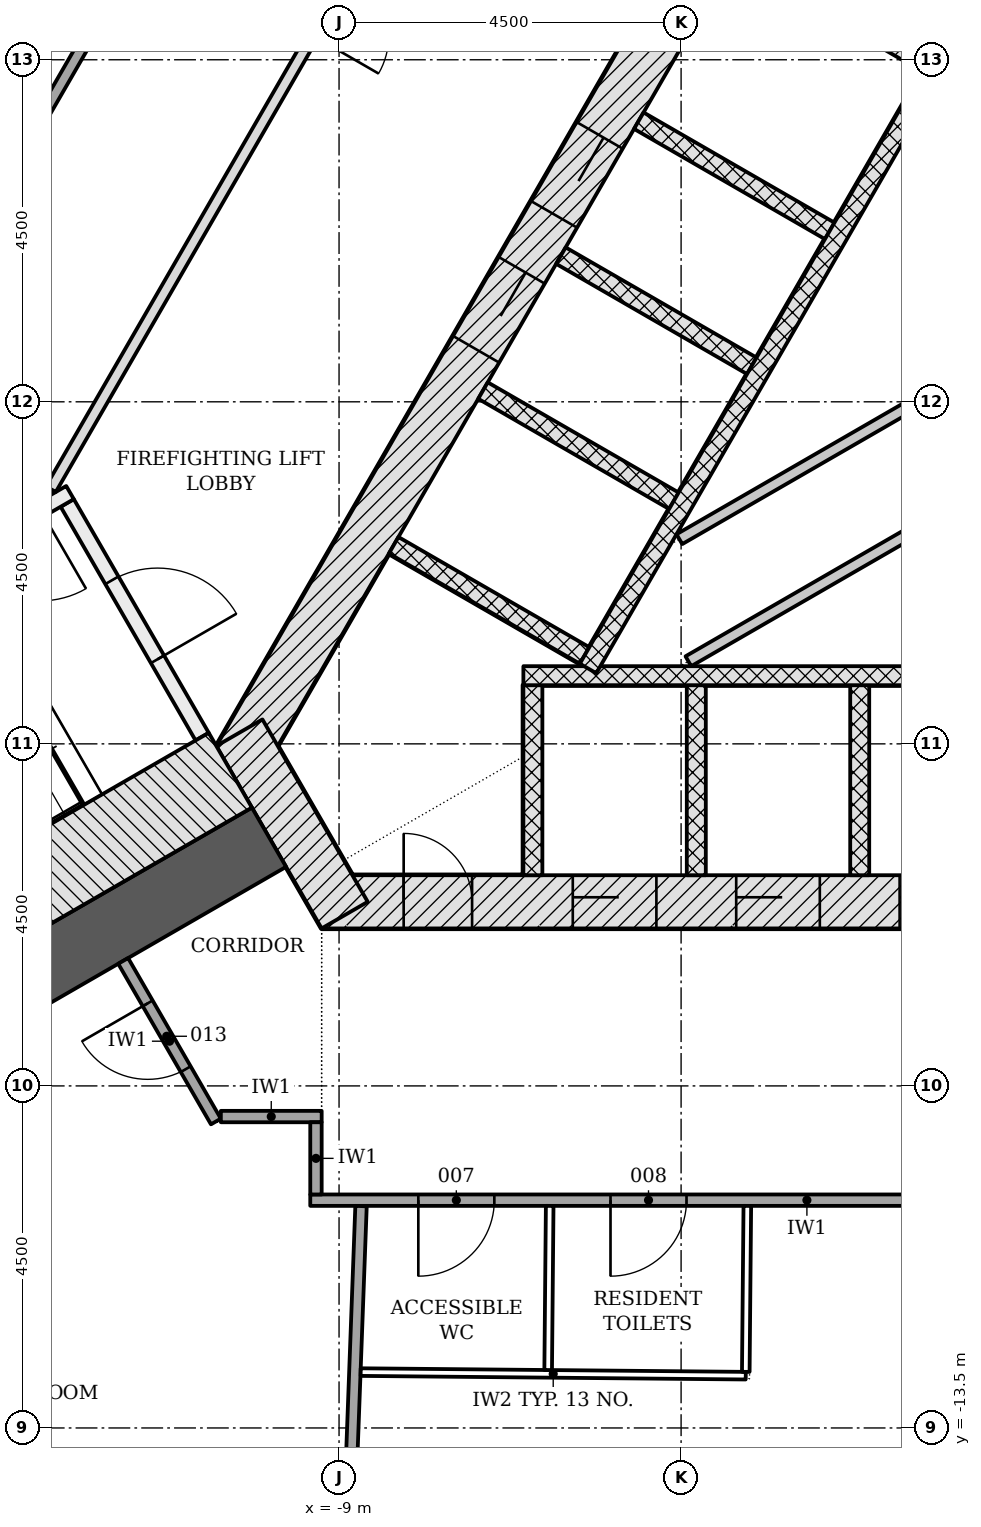
"""IFC4 building model, lengths in metres.
Left out: names, types, materials, properties, quantities, classifications, styles, units other than length and angle.
Written with IfcOpenShell. Run it as: python <this file> out.ifc"""

import sys

from ifc_helpers import new_model, si_unit, direction, frame, frame_2d, origin, place, context, subcontext, project, spatial, rectangle, extrude, element, fill, save


model = new_model("IFC4")
c1 = context("Model", 3, precision=1e-05, world=origin(), true_north=direction((0.0, 1.0)))
c2 = subcontext(c1, "Body", "Model", "MODEL_VIEW")
j1 = project(units=[si_unit("LENGTHUNIT", "METRE"), si_unit("PLANEANGLEUNIT", "RADIAN")], contexts=[c1])
p1 = place(None, origin())
s1 = spatial("IfcSite", under=j1, at=p1, CompositionType="ELEMENT")
p2 = place(p1, origin())
s2 = spatial("IfcBuilding", under=s1, at=p2, CompositionType="ELEMENT")
p3 = place(p2, frame((0.0, 0.0, 27.6)))
s3 = spatial("IfcBuildingStorey", under=s2, at=p3, CompositionType="ELEMENT", Elevation=27.6)
p4 = place(p3, frame((-9.229, -6.578, -0.2), z_axis=(0.0, 0.0, 1.0), x_axis=(1.0, 0.0, 0.0)))
e1 = element("IfcWall", 1, at=p4, inside=s3, PredefinedType="SHEAR", context=c2, shape_type="SweptSolid", body=[
    extrude(rectangle(XDim=18.458, YDim=0.7, at=frame_2d((9.229, 0.0))), origin(), (0.0, 0.0, 1.0), 3.6),
])
p5 = place(p4, frame((3.304, 0.0, 0.2)))
e2 = element("IfcOpeningElement", 2, at=p5, cuts=e1, PredefinedType="OPENING", context=c2, shape_type="SweptSolid", body=[
    extrude(rectangle(XDim=1.1, YDim=2.1, at=frame_2d((0.55, 1.05))), frame((0.0, 0.36, 0.0), z_axis=(0.0, -1.0, 0.0), x_axis=(1.0, 0.0, 0.0)), (0.0, 0.0, 1.0), 0.72),
])
p6 = place(p4, frame((5.454, 0.0, 0.2)))
e3 = element("IfcOpeningElement", 3, at=p6, cuts=e1, PredefinedType="OPENING", context=c2, shape_type="SweptSolid", body=[
    extrude(rectangle(XDim=1.1, YDim=2.1, at=frame_2d((0.55, 1.05))), frame((0.0, 0.36, 0.0), z_axis=(0.0, -1.0, 0.0), x_axis=(1.0, 0.0, 0.0)), (0.0, 0.0, 1.0), 0.72),
])
p7 = place(p4, frame((7.604, 0.0, 0.2)))
e4 = element("IfcOpeningElement", 4, at=p7, cuts=e1, PredefinedType="OPENING", context=c2, shape_type="SweptSolid", body=[
    extrude(rectangle(XDim=1.1, YDim=2.1, at=frame_2d((0.55, 1.05))), frame((0.0, 0.36, 0.0), z_axis=(0.0, -1.0, 0.0), x_axis=(1.0, 0.0, 0.0)), (0.0, 0.0, 1.0), 0.72),
])
p8 = place(p4, frame((9.754, 0.0, 0.2)))
e5 = element("IfcOpeningElement", 5, at=p8, cuts=e1, PredefinedType="OPENING", context=c2, shape_type="SweptSolid", body=[
    extrude(rectangle(XDim=1.1, YDim=2.1, at=frame_2d((0.55, 1.05))), frame((0.0, 0.36, 0.0), z_axis=(0.0, -1.0, 0.0), x_axis=(1.0, 0.0, 0.0)), (0.0, 0.0, 1.0), 0.72),
])
p9 = place(p4, frame((11.904, 0.0, 0.2)))
e6 = element("IfcOpeningElement", 6, at=p9, cuts=e1, PredefinedType="OPENING", context=c2, shape_type="SweptSolid", body=[
    extrude(rectangle(XDim=1.1, YDim=2.1, at=frame_2d((0.55, 1.05))), frame((0.0, 0.36, 0.0), z_axis=(0.0, -1.0, 0.0), x_axis=(1.0, 0.0, 0.0)), (0.0, 0.0, 1.0), 0.72),
])
p10 = place(p4, frame((14.054, 0.0, 0.2)))
e7 = element("IfcOpeningElement", 7, at=p10, cuts=e1, PredefinedType="OPENING", context=c2, shape_type="SweptSolid", body=[
    extrude(rectangle(XDim=1.1, YDim=2.1, at=frame_2d((0.55, 1.05))), frame((0.0, 0.36, 0.0), z_axis=(0.0, -1.0, 0.0), x_axis=(1.0, 0.0, 0.0)), (0.0, 0.0, 1.0), 0.72),
])
p11 = place(p4, frame((1.079, 0.0, 0.2)))
e8 = element("IfcOpeningElement", 8, at=p11, cuts=e1, PredefinedType="OPENING", context=c2, shape_type="SweptSolid", body=[
    extrude(rectangle(XDim=0.9, YDim=2.1, at=frame_2d((0.45, 1.05))), frame((0.0, 0.36, 0.0), z_axis=(0.0, -1.0, 0.0), x_axis=(1.0, 0.0, 0.0)), (0.0, 0.0, 1.0), 0.72),
])
p12 = place(p3, frame((-1.083, 11.281, -0.2), z_axis=(0.0, 0.0, 1.0), x_axis=(-0.500001446645, -0.866024568562, 0.0)))
e9 = element("IfcWall", 9, at=p12, inside=s3, PredefinedType="SHEAR", context=c2, shape_type="SweptSolid", body=[
    extrude(rectangle(XDim=18.458, YDim=0.7, at=frame_2d((9.229, 0.0))), origin(), (0.0, 0.0, 1.0), 3.6),
])
p13 = place(p12, frame((8.979, 0.0, 0.2)))
e10 = element("IfcOpeningElement", 10, at=p13, cuts=e9, PredefinedType="OPENING", context=c2, shape_type="SweptSolid", body=[
    extrude(rectangle(XDim=1.2, YDim=2.1, at=frame_2d((0.6, 1.05))), frame((0.0, 0.36, 0.0), z_axis=(0.0, -1.0, 0.0), x_axis=(1.0, 0.0, 0.0)), (0.0, 0.0, 1.0), 0.72),
])
p14 = place(p12, frame((11.029, 0.0, 0.2)))
e11 = element("IfcOpeningElement", 11, at=p14, cuts=e9, PredefinedType="OPENING", context=c2, shape_type="SweptSolid", body=[
    extrude(rectangle(XDim=1.2, YDim=2.1, at=frame_2d((0.6, 1.05))), frame((0.0, 0.36, 0.0), z_axis=(0.0, -1.0, 0.0), x_axis=(1.0, 0.0, 0.0)), (0.0, 0.0, 1.0), 0.72),
])
p15 = place(p3, frame((-10.311, -4.353, -0.2), z_axis=(0.0, 0.0, 1.0), x_axis=(0.500042739161, -0.866000726912, 0.0)))
e12 = element("IfcWall", 12, at=p15, inside=s3, PredefinedType="SHEAR", context=c2, shape_type="SweptSolid", body=[
    extrude(rectangle(XDim=2.771, YDim=0.7, at=frame_2d((1.386, 0.0))), origin(), (0.0, 0.0, 1.0), 3.6),
])
p16 = place(p3, frame((-9.922, -5.728, -0.2), z_axis=(0.0, 0.0, 1.0), x_axis=(-0.866028046028, -0.499995423472, 0.0)))
e13 = element("IfcWall", 13, at=p16, inside=s3, PredefinedType="SHEAR", context=c2, shape_type="SweptSolid", body=[
    extrude(rectangle(XDim=14.633, YDim=0.9, at=frame_2d((7.316, 0.0))), origin(), (0.0, 0.0, 1.0), 3.6),
])
for number, where, z_axis, x_axis in (
    (14, (-6.45, -6.228, -0.2), (0.0, 0.0, 1.0), (0.0, 1.0, 0.0)),
    (15, (-4.3, -6.228, -0.2), (0.0, 0.0, 1.0), (0.0, 1.0, 0.0)),
    (16, (-2.15, -6.228, -0.2), (0.0, 0.0, 1.0), (0.0, 1.0, 0.0)),
):
    element("IfcWall", number, at=place(p3, frame(where, z_axis=z_axis, x_axis=x_axis)), inside=s3, PredefinedType="PARTITIONING", context=c2, shape_type="SweptSolid", body=[
        extrude(rectangle(XDim=2.5, YDim=0.25, at=frame_2d((1.25, 0.0))), origin(), (0.0, 0.0, 1.0), 3.6),
    ])
p17 = place(p3, frame((-6.575, -3.603, 0.0), z_axis=(0.0, 0.0, 1.0), x_axis=(1.0, 0.0, 0.0)))
e17 = element("IfcWall", 17, at=p17, inside=s3, PredefinedType="PARTITIONING", context=c2, shape_type="SweptSolid", body=[
    extrude(rectangle(XDim=13.15, YDim=0.25, at=frame_2d((6.575, 0.0))), origin(), (0.0, 0.0, 1.0), 3.4),
])
for number, where, z_axis, x_axis in (
    (18, (-3.781, 5.907, -0.2), (0.0, 0.0, 1.0), (0.866, -0.5, 0.0)),
    (19, (-5.056, 3.699, -0.2), (0.0, 0.0, 1.0), (0.866, -0.5, 0.0)),
    (20, (-6.081, 1.923, -0.2), (0.0, 0.0, 1.0), (0.866, -0.5, 0.0)),
    (21, (-7.106, 0.148, -0.2), (0.0, 0.0, 1.0), (0.866, -0.5, 0.0)),
    (22, (-8.281, -1.887, -0.2), (0.0, 0.0, 1.0), (0.866, -0.5, 0.0)),
):
    element("IfcWall", number, at=place(p3, frame(where, z_axis=z_axis, x_axis=x_axis)), inside=s3, PredefinedType="PARTITIONING", context=c2, shape_type="SweptSolid", body=[
        extrude(rectangle(XDim=2.9, YDim=0.25, at=frame_2d((1.45, 0.0))), origin(), (0.0, 0.0, 1.0), 3.6),
    ])
p18 = place(p3, frame((0.176, 6.711, 0.0), z_axis=(0.0, 0.0, 1.0), x_axis=(-0.500004227369, -0.866022963098, 0.0)))
e23 = element("IfcWall", 23, at=p18, inside=s3, PredefinedType="PARTITIONING", context=c2, shape_type="SweptSolid", body=[
    extrude(rectangle(XDim=11.8, YDim=0.25, at=frame_2d((5.9, 0.0))), origin(), (0.0, 0.0, 1.0), 3.4),
])
p19 = place(p3, frame((-4.523, -1.807, 0.0), z_axis=(0.0, 0.0, 1.0), x_axis=(0.866030300338, 0.499991518824, 0.0)))
e24 = element("IfcWall", 24, at=p19, inside=s3, PredefinedType="PARTITIONING", context=c2, shape_type="SweptSolid", body=[
    extrude(rectangle(XDim=11.049, YDim=0.15, at=frame_2d((5.524, 0.0))), origin(), (0.0, 0.0, 1.0), 3.4),
])
p20 = place(p19, frame((3.525, 0.0, 0.0)))
e25 = element("IfcOpeningElement", 25, at=p20, cuts=e24, PredefinedType="OPENING", context=c2, shape_type="SweptSolid", body=[
    extrude(rectangle(XDim=0.9, YDim=2.1, at=frame_2d((0.45, 1.05))), frame((0.0, 0.085, 0.0), z_axis=(0.0, -1.0, 0.0), x_axis=(1.0, 0.0, 0.0)), (0.0, 0.0, 1.0), 0.17),
])
p21 = place(p3, frame((-4.404, -3.413, 0.0), z_axis=(0.0, 0.0, 1.0), x_axis=(0.866022252853, 0.500005457533, 0.0)))
e26 = element("IfcWall", 26, at=p21, inside=s3, PredefinedType="PARTITIONING", context=c2, shape_type="SweptSolid", body=[
    extrude(rectangle(XDim=11.749, YDim=0.15, at=frame_2d((5.875, 0.0))), origin(), (0.0, 0.0, 1.0), 3.4),
])
p22 = place(p21, frame((3.875, 0.0, 0.0)))
e27 = element("IfcOpeningElement", 27, at=p22, cuts=e26, PredefinedType="OPENING", context=c2, shape_type="SweptSolid", body=[
    extrude(rectangle(XDim=0.9, YDim=2.1, at=frame_2d((0.45, 1.05))), frame((0.0, 0.085, 0.0), z_axis=(0.0, -1.0, 0.0), x_axis=(1.0, 0.0, 0.0)), (0.0, 0.0, 1.0), 0.17),
])
p23 = place(p3, frame((-12.576, -1.331, -0.2), z_axis=(0.0, 0.0, 1.0), x_axis=(0.499970499736, -0.8660424351, 0.0)))
e28 = element("IfcWall", 28, at=p23, inside=s3, PredefinedType="SHEAR", context=c2, shape_type="SweptSolid", body=[
    extrude(rectangle(XDim=3.55, YDim=0.2, at=frame_2d((1.775, 0.0))), origin(), (0.0, 0.0, 1.0), 3.6),
])
p24 = place(p23, frame((1.175, 0.0, 0.2)))
e29 = element("IfcOpeningElement", 29, at=p24, cuts=e28, PredefinedType="OPENING", context=c2, shape_type="SweptSolid", body=[
    extrude(rectangle(XDim=1.2, YDim=2.1, at=frame_2d((0.6, 1.05))), frame((0.0, 0.11, 0.0), z_axis=(0.0, -1.0, 0.0), x_axis=(1.0, 0.0, 0.0)), (0.0, 0.0, 1.0), 0.22),
])
p25 = place(p3, frame((-12.539, -1.194, -0.2), z_axis=(0.0, 0.0, 1.0), x_axis=(-0.866045472092, -0.499965239061, 0.0)))
e30 = element("IfcWall", 30, at=p25, inside=s3, PredefinedType="SHEAR", context=c2, shape_type="SweptSolid", body=[
    extrude(rectangle(XDim=5.6, YDim=0.2, at=frame_2d((2.8, 0.0))), origin(), (0.0, 0.0, 1.0), 3.6),
])
p26 = place(p25, frame((0.45, 0.0, 0.2)))
e31 = element("IfcOpeningElement", 31, at=p26, cuts=e30, PredefinedType="OPENING", context=c2, shape_type="SweptSolid", body=[
    extrude(rectangle(XDim=1.2, YDim=2.1, at=frame_2d((0.6, 1.05))), frame((0.0, 0.11, 0.0), z_axis=(0.0, -1.0, 0.0), x_axis=(1.0, 0.0, 0.0)), (0.0, 0.0, 1.0), 0.22),
])
p27 = place(p3, frame((-10.43, -4.847, -0.2), z_axis=(0.0, 0.0, 1.0), x_axis=(-0.866018442252, -0.500012057535, 0.0)))
e32 = element("IfcWall", 32, at=p27, inside=s3, PredefinedType="SHEAR", context=c2, shape_type="SweptSolid", body=[
    extrude(rectangle(XDim=7.2, YDim=1.136, at=frame_2d((3.6, 0.0))), origin(), (0.0, 0.0, 1.0), 3.6),
])
p28 = place(p3, frame((-17.208, -3.699, 0.0), z_axis=(0.0, 0.0, 1.0), x_axis=(0.499997567621, 0.866026808115, 0.0)))
e33 = element("IfcWall", 33, at=p28, inside=s3, PredefinedType="PARTITIONING", context=c2, shape_type="SweptSolid", body=[
    extrude(rectangle(XDim=23.736, YDim=0.15, at=frame_2d((11.868, 0.0))), origin(), (0.0, 0.0, 1.0), 2.768),
])
p29 = place(p28, frame((16.656, 0.0, 0.0)))
e34 = element("IfcOpeningElement", 34, at=p29, cuts=e33, PredefinedType="OPENING", context=c2, shape_type="SweptSolid", body=[
    extrude(rectangle(XDim=1.1, YDim=2.1, at=frame_2d((0.55, 1.05))), frame((0.0, 0.085, 0.0), z_axis=(0.0, -1.0, 0.0), x_axis=(1.0, 0.0, 0.0)), (0.0, 0.0, 1.0), 0.17),
])
p30 = place(p28, frame((14.662, 0.0, 0.0)))
e35 = element("IfcOpeningElement", 35, at=p30, cuts=e33, PredefinedType="OPENING", context=c2, shape_type="SweptSolid", body=[
    extrude(rectangle(XDim=1.1, YDim=2.1, at=frame_2d((0.55, 1.05))), frame((0.0, 0.085, 0.0), z_axis=(0.0, -1.0, 0.0), x_axis=(1.0, 0.0, 0.0)), (0.0, 0.0, 1.0), 0.17),
])
p31 = place(p28, frame((5.273, 0.0, 0.0)))
e36 = element("IfcOpeningElement", 36, at=p31, cuts=e33, PredefinedType="OPENING", context=c2, shape_type="SweptSolid", body=[
    extrude(rectangle(XDim=1.0, YDim=2.1, at=frame_2d((0.5, 1.05))), frame((0.0, 0.085, 0.0), z_axis=(0.0, -1.0, 0.0), x_axis=(1.0, 0.0, 0.0)), (0.0, 0.0, 1.0), 0.17),
])
p32 = place(p3, frame((-4.407, 13.374, 0.0), z_axis=(0.0, 0.0, 1.0), x_axis=(-0.499997181693, -0.866027030928, 0.0)))
e37 = element("IfcWall", 37, at=p32, inside=s3, PredefinedType="PARTITIONING", context=c2, shape_type="SweptSolid", body=[
    extrude(rectangle(XDim=16.77, YDim=0.15, at=frame_2d((8.385, 0.0))), origin(), (0.0, 0.0, 1.0), 2.768),
])
p33 = place(p32, frame((8.879, 0.0, 0.0)))
e38 = element("IfcOpeningElement", 38, at=p33, cuts=e37, PredefinedType="OPENING", context=c2, shape_type="SweptSolid", body=[
    extrude(rectangle(XDim=1.0, YDim=2.1, at=frame_2d((0.5, 1.05))), frame((0.0, 0.085, 0.0), z_axis=(0.0, -1.0, 0.0), x_axis=(1.0, 0.0, 0.0)), (0.0, 0.0, 1.0), 0.17),
])
p34 = place(p3, frame((3.689, -10.503, 0.0), z_axis=(0.0, 0.0, 1.0), x_axis=(-1.0, 0.0, 0.0)))
e39 = element("IfcWall", 39, at=p34, inside=s3, PredefinedType="PARTITIONING", context=c2, shape_type="SweptSolid", body=[
    extrude(rectangle(XDim=13.068, YDim=0.15, at=frame_2d((6.534, 0.0))), origin(), (0.0, 0.0, 1.0), 2.768),
])
p35 = place(p34, frame((10.646, 0.0, 0.0)))
e40 = element("IfcOpeningElement", 40, at=p35, cuts=e39, PredefinedType="OPENING", context=c2, shape_type="SweptSolid", body=[
    extrude(rectangle(XDim=1.0, YDim=2.1, at=frame_2d((0.5, 1.05))), frame((0.0, 0.085, 0.0), z_axis=(0.0, -1.0, 0.0), x_axis=(1.0, 0.0, 0.0)), (0.0, 0.0, 1.0), 0.17),
])
p36 = place(p34, frame((8.118, 0.0, 0.0)))
e41 = element("IfcOpeningElement", 41, at=p36, cuts=e39, PredefinedType="OPENING", context=c2, shape_type="SweptSolid", body=[
    extrude(rectangle(XDim=1.0, YDim=2.1, at=frame_2d((0.5, 1.05))), frame((0.0, 0.085, 0.0), z_axis=(0.0, -1.0, 0.0), x_axis=(1.0, 0.0, 0.0)), (0.0, 0.0, 1.0), 0.17),
])
p37 = place(p34, frame((2.986, 0.0, 0.0)))
e42 = element("IfcOpeningElement", 42, at=p37, cuts=e39, PredefinedType="OPENING", context=c2, shape_type="SweptSolid", body=[
    extrude(rectangle(XDim=1.5, YDim=2.1, at=frame_2d((0.75, 1.05))), frame((0.0, 0.085, 0.0), z_axis=(0.0, -1.0, 0.0), x_axis=(1.0, 0.0, 0.0)), (0.0, 0.0, 1.0), 0.17),
])
p38 = place(p3, frame((-10.62, -9.468, 0.0), z_axis=(0.0, 0.0, 1.0), x_axis=(-0.500045838785, 0.865998937132, 0.0)))
e43 = element("IfcWall", 43, at=p38, inside=s3, PredefinedType="PARTITIONING", context=c2, shape_type="SweptSolid", body=[
    extrude(rectangle(XDim=2.44, YDim=0.15, at=frame_2d((1.22, 0.0))), origin(), (0.0, 0.0, 1.0), 3.4),
])
p39 = place(p38, frame((0.795, 0.0, 0.0)))
e44 = element("IfcOpeningElement", 44, at=p39, cuts=e43, PredefinedType="OPENING", context=c2, shape_type="SweptSolid", body=[
    extrude(rectangle(XDim=1.0, YDim=2.1, at=frame_2d((0.5, 1.05))), frame((0.0, 0.085, 0.0), z_axis=(0.0, -1.0, 0.0), x_axis=(1.0, 0.0, 0.0)), (0.0, 0.0, 1.0), 0.17),
])
p40 = place(p3, frame((-10.555, -9.403, 0.0), z_axis=(0.0, 0.0, 1.0), x_axis=(1.0, 0.0, 0.0)))
e45 = element("IfcWall", 45, at=p40, inside=s3, PredefinedType="PARTITIONING", context=c2, shape_type="SweptSolid", body=[
    extrude(rectangle(XDim=1.326, YDim=0.15, at=frame_2d((0.663, 0.0))), origin(), (0.0, 0.0, 1.0), 3.4),
])
p41 = place(p3, frame((-9.304, -10.428, 0.0), z_axis=(0.0, 0.0, 1.0), x_axis=(0.0, 1.0, 0.0)))
e46 = element("IfcWall", 46, at=p41, inside=s3, PredefinedType="PARTITIONING", context=c2, shape_type="SweptSolid", body=[
    extrude(rectangle(XDim=0.95, YDim=0.15, at=frame_2d((0.475, 0.0))), origin(), (0.0, 0.0, 1.0), 3.4),
])
p42 = place(p3, frame((-8.968, -17.517, 0.0), z_axis=(0.0, 0.0, 1.0), x_axis=(0.037111842783, 0.999311118284, 0.0)))
e47 = element("IfcWall", 47, at=p42, inside=s3, PredefinedType="PARTITIONING", context=c2, shape_type="SweptSolid", body=[
    extrude(rectangle(XDim=6.94, YDim=0.15, at=frame_2d((3.47, 0.0))), origin(), (0.0, 0.0, 1.0), 2.768),
])
p43 = place(p3, frame((-8.715, -12.765, 0.0), z_axis=(0.0, 0.0, 1.0), x_axis=(0.999957193633, -0.00925261596, 0.0)))
e48 = element("IfcWall", 48, at=p43, inside=s3, PredefinedType="PARTITIONING", context=c2, shape_type="SweptSolid", body=[
    extrude(rectangle(XDim=5.066, YDim=0.1, at=frame_2d((2.533, 0.0))), origin(), (0.0, 0.0, 1.0), 2.768),
])
p44 = place(p3, frame((-3.649, -12.762, 0.0), z_axis=(0.0, 0.0, 1.0), x_axis=(0.009279564663, 0.999956943913, 0.0)))
e49 = element("IfcWall", 49, at=p44, inside=s3, PredefinedType="PARTITIONING", context=c2, shape_type="SweptSolid", body=[
    extrude(rectangle(XDim=2.184, YDim=0.1, at=frame_2d((1.092, 0.0))), origin(), (0.0, 0.0, 1.0), 3.4),
])
p45 = place(p3, frame((-6.249, -12.738, 0.0), z_axis=(0.0, 0.0, 1.0), x_axis=(0.009270376076, 0.99995702914, 0.0)))
e50 = element("IfcWall", 50, at=p45, inside=s3, PredefinedType="PARTITIONING", context=c2, shape_type="SweptSolid", body=[
    extrude(rectangle(XDim=2.159, YDim=0.1, at=frame_2d((1.08, 0.0))), origin(), (0.0, 0.0, 1.0), 3.4),
])
p46 = place(p5, origin())
e51 = element("IfcDoor", 51, at=p46, inside=s3, OperationType="DOUBLE_DOOR_SLIDING", PredefinedType="DOOR", context=c2, shape_type="SweptSolid", body=[
    extrude(rectangle(XDim=1.1, YDim=2.1, at=frame_2d((0.55, 1.05))), frame((0.0, 0.025, 0.0), z_axis=(0.0, -1.0, 0.0), x_axis=(1.0, 0.0, 0.0)), (0.0, 0.0, 1.0), 0.05),
])
fill(e2, e51)
p47 = place(p6, origin())
e52 = element("IfcDoor", 52, at=p47, inside=s3, OperationType="DOUBLE_DOOR_SLIDING", PredefinedType="DOOR", context=c2, shape_type="SweptSolid", body=[
    extrude(rectangle(XDim=1.1, YDim=2.1, at=frame_2d((0.55, 1.05))), frame((0.0, 0.025, 0.0), z_axis=(0.0, -1.0, 0.0), x_axis=(1.0, 0.0, 0.0)), (0.0, 0.0, 1.0), 0.05),
])
fill(e3, e52)
p48 = place(p7, origin())
e53 = element("IfcDoor", 53, at=p48, inside=s3, OperationType="DOUBLE_DOOR_SLIDING", PredefinedType="DOOR", context=c2, shape_type="SweptSolid", body=[
    extrude(rectangle(XDim=1.1, YDim=2.1, at=frame_2d((0.55, 1.05))), frame((0.0, 0.025, 0.0), z_axis=(0.0, -1.0, 0.0), x_axis=(1.0, 0.0, 0.0)), (0.0, 0.0, 1.0), 0.05),
])
fill(e4, e53)
p49 = place(p13, origin())
e54 = element("IfcDoor", 54, at=p49, inside=s3, OperationType="DOUBLE_DOOR_SLIDING", PredefinedType="DOOR", context=c2, shape_type="SweptSolid", body=[
    extrude(rectangle(XDim=1.2, YDim=2.1, at=frame_2d((0.6, 1.05))), frame((0.0, 0.025, 0.0), z_axis=(0.0, -1.0, 0.0), x_axis=(1.0, 0.0, 0.0)), (0.0, 0.0, 1.0), 0.05),
])
fill(e10, e54)
p50 = place(p14, origin())
e55 = element("IfcDoor", 55, at=p50, inside=s3, OperationType="DOUBLE_DOOR_SLIDING", PredefinedType="DOOR", context=c2, shape_type="SweptSolid", body=[
    extrude(rectangle(XDim=1.2, YDim=2.1, at=frame_2d((0.6, 1.05))), frame((0.0, 0.025, 0.0), z_axis=(0.0, -1.0, 0.0), x_axis=(1.0, 0.0, 0.0)), (0.0, 0.0, 1.0), 0.05),
])
fill(e11, e55)
p51 = place(p11, origin())
e56 = element("IfcDoor", 56, at=p51, inside=s3, OperationType="SINGLE_SWING_LEFT", PredefinedType="DOOR", context=c2, shape_type="SweptSolid", body=[
    extrude(rectangle(XDim=0.9, YDim=2.1, at=frame_2d((0.45, 1.05))), frame((0.0, 0.075, 0.0), z_axis=(0.0, -1.0, 0.0), x_axis=(1.0, 0.0, 0.0)), (0.0, 0.0, 1.0), 0.15),
])
fill(e8, e56)
p52 = place(p24, origin())
e57 = element("IfcDoor", 57, at=p52, inside=s3, OperationType="SINGLE_SWING_RIGHT", PredefinedType="DOOR", context=c2, shape_type="SweptSolid", body=[
    extrude(rectangle(XDim=1.2, YDim=2.1, at=frame_2d((0.6, 1.05))), frame((0.0, 0.025, 0.0), z_axis=(0.0, -1.0, 0.0), x_axis=(1.0, 0.0, 0.0)), (0.0, 0.0, 1.0), 0.05),
])
fill(e29, e57)
p53 = place(p35, origin())
e58 = element("IfcDoor", 58, at=p53, inside=s3, OperationType="SINGLE_SWING_RIGHT", PredefinedType="DOOR", context=c2, shape_type="SweptSolid", body=[
    extrude(rectangle(XDim=1.0, YDim=2.1, at=frame_2d((0.5, 1.05))), frame((0.0, 0.025, 0.0), z_axis=(0.0, -1.0, 0.0), x_axis=(1.0, 0.0, 0.0)), (0.0, 0.0, 1.0), 0.05),
])
fill(e40, e58)
p54 = place(p36, origin())
e59 = element("IfcDoor", 59, at=p54, inside=s3, OperationType="SINGLE_SWING_RIGHT", PredefinedType="DOOR", context=c2, shape_type="SweptSolid", body=[
    extrude(rectangle(XDim=1.0, YDim=2.1, at=frame_2d((0.5, 1.05))), frame((0.0, 0.025, 0.0), z_axis=(0.0, -1.0, 0.0), x_axis=(1.0, 0.0, 0.0)), (0.0, 0.0, 1.0), 0.05),
])
fill(e41, e59)
p55 = place(p39, origin())
e60 = element("IfcDoor", 60, at=p55, inside=s3, OperationType="SINGLE_SWING_RIGHT", PredefinedType="DOOR", context=c2, shape_type="SweptSolid", body=[
    extrude(rectangle(XDim=1.0, YDim=2.1, at=frame_2d((0.5, 1.05))), frame((0.0, 0.025, 0.0), z_axis=(0.0, -1.0, 0.0), x_axis=(1.0, 0.0, 0.0)), (0.0, 0.0, 1.0), 0.05),
])
fill(e44, e60)
save(model, sys.argv[1])
